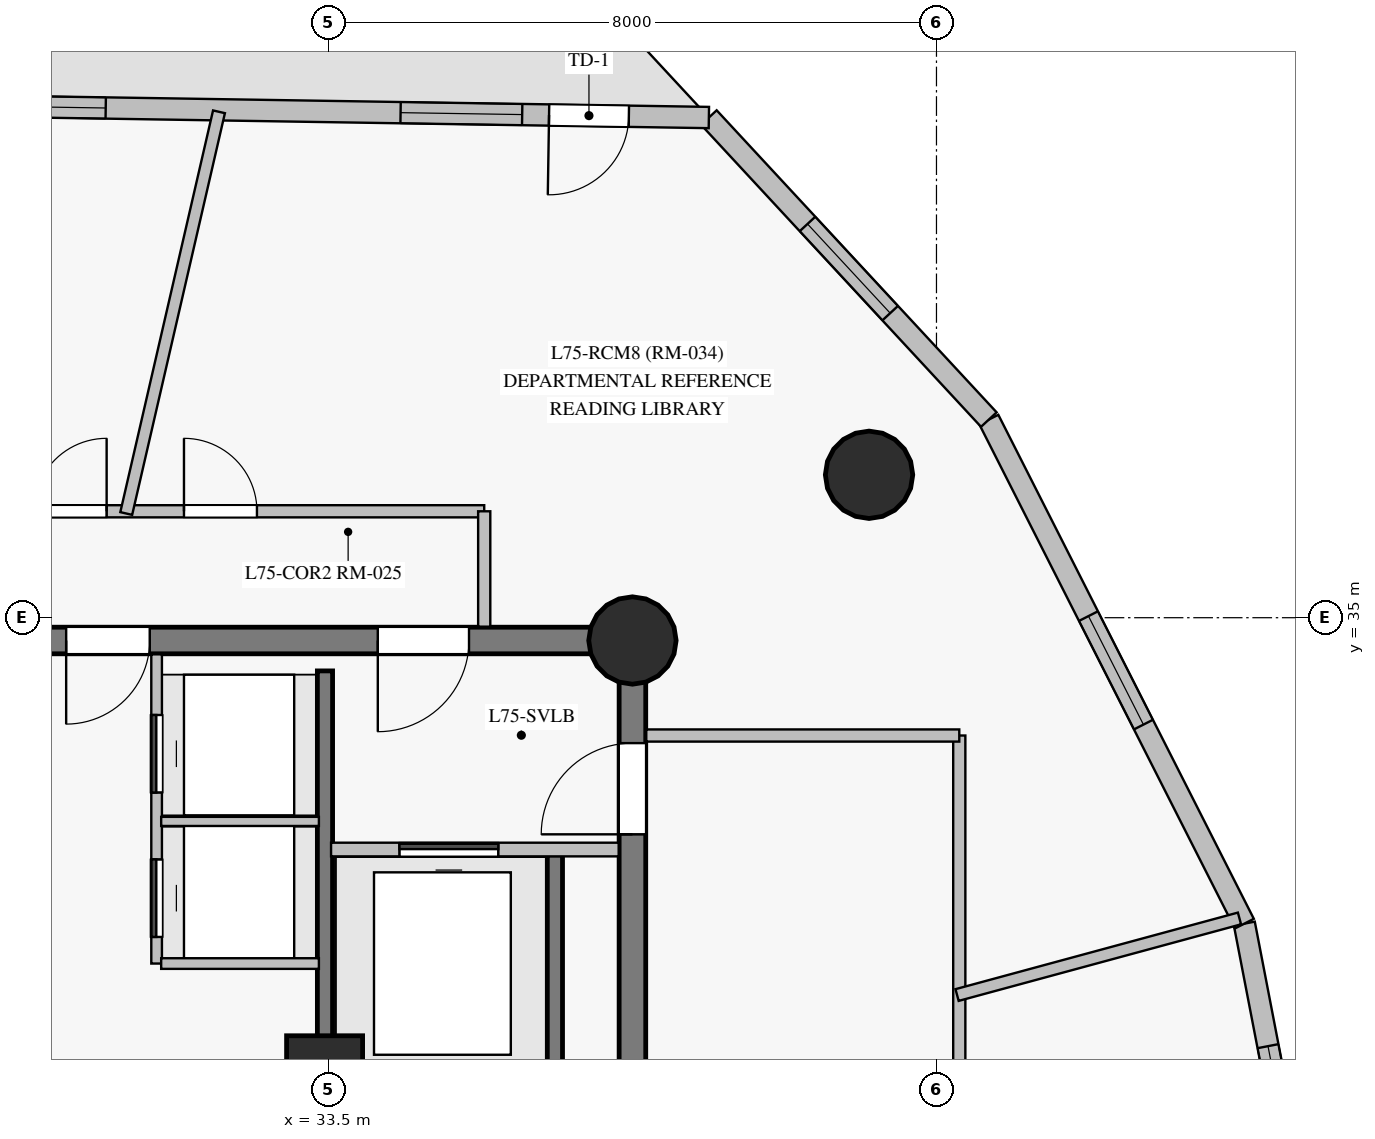
"""IFC4 building model, lengths in metres.
Left out: names, types, materials, properties, quantities, classifications, styles, units other than length and angle.
Written with IfcOpenShell. Run it as: python <this file> out.ifc"""

import sys

from ifc_helpers import new_model, si_unit, direction, frame, frame_2d, origin, origin_with_axes, origin_2d, place, context, subcontext, project, spatial, rectangle, circle, extrude, source, transform, mapped, element, fill, save


model = new_model("IFC4")
c1 = context("Model", 3, precision=1e-05, world=origin(), true_north=direction((0.0, 1.0)))
c2 = subcontext(c1, "Body", "Model", "MODEL_VIEW")
j1 = project(units=[si_unit("LENGTHUNIT", "METRE"), si_unit("PLANEANGLEUNIT", "RADIAN")], contexts=[c1])
p1 = place(None, origin())
s1 = spatial("IfcSite", under=j1, at=p1, CompositionType="ELEMENT")
p2 = place(p1, origin())
s2 = spatial("IfcBuilding", under=s1, at=p2, CompositionType="ELEMENT")
p3 = place(p2, frame((0.0, 0.0, 253.5)))
s3 = spatial("IfcBuildingStorey", under=s2, at=p3, CompositionType="ELEMENT", Elevation=253.5)
p4 = place(p3, frame((37.5, 18.3, 0.0), z_axis=(0.0, 0.0, 1.0), x_axis=(0.0, 1.0, 0.0)))
e1 = element("IfcWall", 1, at=p4, inside=s3, PredefinedType="SHEAR", context=c2, shape_type="SweptSolid", body=[
    extrude(rectangle(XDim=16.4, YDim=0.35, at=frame_2d((8.2, 0.0))), origin(), (0.0, 0.0, 1.0), 2.85),
])
p5 = place(p4, frame((13.85, 0.0, 0.0)))
e2 = element("IfcOpeningElement", 2, at=p5, cuts=e1, PredefinedType="OPENING", context=c2, shape_type="SweptSolid", body=[
    extrude(rectangle(XDim=1.2, YDim=2.15, at=frame_2d((0.6, 1.075))), frame((0.0, 0.185, 0.0), z_axis=(0.0, -1.0, 0.0), x_axis=(1.0, 0.0, 0.0)), (0.0, 0.0, 1.0), 0.37),
])
p6 = place(p3, frame((37.5, 34.7, 0.0), z_axis=(0.0, 0.0, 1.0), x_axis=(-1.0, 0.0, 0.0)))
e3 = element("IfcWall", 3, at=p6, inside=s3, PredefinedType="SHEAR", context=c2, shape_type="SweptSolid", body=[
    extrude(rectangle(XDim=10.95, YDim=0.35, at=frame_2d((5.475, 0.0))), origin(), (0.0, 0.0, 1.0), 2.85),
])
p7 = place(p6, frame((2.15, 0.0, 0.0)))
e4 = element("IfcOpeningElement", 4, at=p7, cuts=e3, PredefinedType="OPENING", context=c2, shape_type="SweptSolid", body=[
    extrude(rectangle(XDim=1.2, YDim=2.15, at=frame_2d((0.6, 1.075))), frame((0.0, 0.185, 0.0), z_axis=(0.0, -1.0, 0.0), x_axis=(1.0, 0.0, 0.0)), (0.0, 0.0, 1.0), 0.37),
])
p8 = place(p6, frame((6.35, 0.0, 0.0)))
e5 = element("IfcOpeningElement", 5, at=p8, cuts=e3, PredefinedType="OPENING", context=c2, shape_type="SweptSolid", body=[
    extrude(rectangle(XDim=1.1, YDim=2.15, at=frame_2d((0.55, 1.075))), frame((0.0, 0.185, 0.0), z_axis=(0.0, -1.0, 0.0), x_axis=(1.0, 0.0, 0.0)), (0.0, 0.0, 1.0), 0.37),
])
m1 = source(origin_with_axes(), c2, "Body", "SweptSolid", [
    extrude(circle(Radius=0.575, at=origin_2d()), origin(), (0.0, 0.0, 1.0), 3.05),
])
p9 = place(p3, frame((37.5, 34.7, 0.0), z_axis=(0.0, 0.0, 1.0), x_axis=(1.0, 0.0, 0.0)))
e6 = element("IfcColumn", 6, at=p9, inside=s3, PredefinedType="COLUMN", context=c2, shape_type="MappedRepresentation", body=[
    mapped(m1, transform((0.0, 0.0, 0.0), scale=1.0)),
])
m2 = source(origin_with_axes(), c2, "Body", "SweptSolid", [
    extrude(rectangle(XDim=1.0, YDim=1.0, at=origin_2d()), origin(), (0.0, 0.0, 1.0), 3.05),
])
p10 = place(p3, frame((33.45, 29.0, 0.0), z_axis=(0.0, 0.0, 1.0), x_axis=(1.0, 0.0, 0.0)))
e7 = element("IfcColumn", 7, at=p10, inside=s3, PredefinedType="COLUMN", context=c2, shape_type="MappedRepresentation", body=[
    mapped(m2, transform((0.0, 0.0, 0.0), scale=1.0)),
])
p11 = place(p3, frame((40.613, 36.88, 0.0), z_axis=(0.0, 0.0, 1.0), x_axis=(1.0, 0.0, 0.0)))
e8 = element("IfcColumn", 8, at=p11, inside=s3, PredefinedType="COLUMN", context=c2, shape_type="MappedRepresentation", body=[
    mapped(m1, transform((0.0, 0.0, 0.0), scale=1.0)),
])
p12 = place(p3, frame((47.615, 20.288, 0.0), z_axis=(0.0, 0.0, 1.0), x_axis=(-0.189663427648, 0.981849165714, 0.0)))
e9 = element("IfcWall", 9, at=p12, inside=s3, PredefinedType="SOLIDWALL", context=c2, shape_type="SweptSolid", body=[
    extrude(rectangle(XDim=10.885, YDim=0.28, at=frame_2d((5.442, 0.0))), origin(), (0.0, 0.0, 1.0), 2.85),
])
p13 = place(p12, frame((0.524, 0.0, 0.85)))
e10 = element("IfcOpeningElement", 10, at=p13, cuts=e9, PredefinedType="OPENING", context=c2, shape_type="SweptSolid", body=[
    extrude(rectangle(XDim=0.95, YDim=1.5, at=frame_2d((0.475, 0.75))), frame((0.0, 0.15, 0.0), z_axis=(0.0, -1.0, 0.0), x_axis=(1.0, 0.0, 0.0)), (0.0, 0.0, 1.0), 0.3),
])
p14 = place(p12, frame((3.52, 0.0, 0.85)))
e11 = element("IfcOpeningElement", 11, at=p14, cuts=e9, PredefinedType="OPENING", context=c2, shape_type="SweptSolid", body=[
    extrude(rectangle(XDim=1.6, YDim=1.6, at=frame_2d((0.8, 0.8))), frame((0.0, 0.15, 0.0), z_axis=(0.0, -1.0, 0.0), x_axis=(1.0, 0.0, 0.0)), (0.0, 0.0, 1.0), 0.3),
])
p15 = place(p12, frame((7.643, 0.0, 0.85)))
e12 = element("IfcOpeningElement", 12, at=p15, cuts=e9, PredefinedType="OPENING", context=c2, shape_type="SweptSolid", body=[
    extrude(rectangle(XDim=1.6, YDim=1.6, at=frame_2d((0.8, 0.8))), frame((0.0, 0.15, 0.0), z_axis=(0.0, -1.0, 0.0), x_axis=(1.0, 0.0, 0.0)), (0.0, 0.0, 1.0), 0.3),
])
p16 = place(p3, frame((45.55, 30.975, 0.0), z_axis=(0.0, 0.0, 1.0), x_axis=(-0.45213236111, 0.891950855169, 0.0)))
e13 = element("IfcWall", 13, at=p16, inside=s3, PredefinedType="SOLIDWALL", context=c2, shape_type="SweptSolid", body=[
    extrude(rectangle(XDim=7.435, YDim=0.28, at=frame_2d((3.717, 0.0))), origin(), (0.0, 0.0, 1.0), 2.85),
])
p17 = place(p16, frame((2.936, 0.0, 0.85)))
e14 = element("IfcOpeningElement", 14, at=p17, cuts=e13, PredefinedType="OPENING", context=c2, shape_type="SweptSolid", body=[
    extrude(rectangle(XDim=1.6, YDim=1.6, at=frame_2d((0.8, 0.8))), frame((0.0, 0.15, 0.0), z_axis=(0.0, -1.0, 0.0), x_axis=(1.0, 0.0, 0.0)), (0.0, 0.0, 1.0), 0.3),
])
p18 = place(p3, frame((42.189, 37.606, 0.0), z_axis=(0.0, 0.0, 1.0), x_axis=(-0.67978713035, 0.733409474584, 0.0)))
e15 = element("IfcWall", 15, at=p18, inside=s3, PredefinedType="SOLIDWALL", context=c2, shape_type="SweptSolid", body=[
    extrude(rectangle(XDim=5.418, YDim=0.28, at=frame_2d((2.709, 0.0))), origin(), (0.0, 0.0, 1.0), 2.85),
])
p19 = place(p18, frame((1.909, 0.0, 0.85)))
e16 = element("IfcOpeningElement", 16, at=p19, cuts=e15, PredefinedType="OPENING", context=c2, shape_type="SweptSolid", body=[
    extrude(rectangle(XDim=1.6, YDim=1.6, at=frame_2d((0.8, 0.8))), frame((0.0, 0.15, 0.0), z_axis=(0.0, -1.0, 0.0), x_axis=(1.0, 0.0, 0.0)), (0.0, 0.0, 1.0), 0.3),
])
p20 = place(p3, frame((38.506, 41.58, 0.0), z_axis=(0.0, 0.0, 1.0), x_axis=(-0.999875036168, 0.015808606765, 0.0)))
e17 = element("IfcWall", 17, at=p20, inside=s3, PredefinedType="SOLIDWALL", context=c2, shape_type="SweptSolid", body=[
    extrude(rectangle(XDim=18.934, YDim=0.28, at=frame_2d((9.467, 0.0))), origin(), (0.0, 0.0, 1.0), 2.85),
])
p21 = place(p20, frame((2.456, 0.0, 0.85)))
e18 = element("IfcOpeningElement", 18, at=p21, cuts=e17, PredefinedType="OPENING", context=c2, shape_type="SweptSolid", body=[
    extrude(rectangle(XDim=1.6, YDim=1.6, at=frame_2d((0.8, 0.8))), frame((0.0, 0.15, 0.0), z_axis=(0.0, -1.0, 0.0), x_axis=(1.0, 0.0, 0.0)), (0.0, 0.0, 1.0), 0.3),
])
p22 = place(p20, frame((7.936, 0.0, 0.85)))
e19 = element("IfcOpeningElement", 19, at=p22, cuts=e17, PredefinedType="OPENING", context=c2, shape_type="SweptSolid", body=[
    extrude(rectangle(XDim=1.6, YDim=1.6, at=frame_2d((0.8, 0.8))), frame((0.0, 0.15, 0.0), z_axis=(0.0, -1.0, 0.0), x_axis=(1.0, 0.0, 0.0)), (0.0, 0.0, 1.0), 0.3),
])
p23 = place(p20, frame((11.863, 0.0, 0.85)))
e20 = element("IfcOpeningElement", 20, at=p23, cuts=e17, PredefinedType="OPENING", context=c2, shape_type="SweptSolid", body=[
    extrude(rectangle(XDim=1.6, YDim=1.6, at=frame_2d((0.8, 0.8))), frame((0.0, 0.15, 0.0), z_axis=(0.0, -1.0, 0.0), x_axis=(1.0, 0.0, 0.0)), (0.0, 0.0, 1.0), 0.3),
])
p24 = place(p20, frame((15.79, 0.0, 0.85)))
e21 = element("IfcOpeningElement", 21, at=p24, cuts=e17, PredefinedType="OPENING", context=c2, shape_type="SweptSolid", body=[
    extrude(rectangle(XDim=1.6, YDim=1.6, at=frame_2d((0.8, 0.8))), frame((0.0, 0.15, 0.0), z_axis=(0.0, -1.0, 0.0), x_axis=(1.0, 0.0, 0.0)), (0.0, 0.0, 1.0), 0.3),
])
p25 = place(p20, frame((1.053, 0.0, 0.0)))
e22 = element("IfcOpeningElement", 22, at=p25, cuts=e17, PredefinedType="OPENING", context=c2, shape_type="SweptSolid", body=[
    extrude(rectangle(XDim=1.05, YDim=2.12, at=frame_2d((0.525, 1.06))), frame((0.0, 0.15, 0.0), z_axis=(0.0, -1.0, 0.0), x_axis=(1.0, 0.0, 0.0)), (0.0, 0.0, 1.0), 0.3),
])
p26 = place(p3, frame((33.455, 18.7, 0.0), z_axis=(0.0, 0.0, 1.0), x_axis=(0.0, 1.0, 0.0)))
e23 = element("IfcWall", 23, at=p26, inside=s3, PredefinedType="SHEAR", context=c2, shape_type="SweptSolid", body=[
    extrude(rectangle(XDim=15.6, YDim=0.2, at=frame_2d((7.8, 0.0))), origin(), (0.0, 0.0, 1.0), 2.85),
])
p27 = place(p26, frame((2.75, 0.0, 0.0)))
e24 = element("IfcOpeningElement", 24, at=p27, cuts=e23, PredefinedType="OPENING", context=c2, shape_type="SweptSolid", body=[
    extrude(rectangle(XDim=1.15, YDim=2.15, at=frame_2d((0.575, 1.075))), frame((0.0, 0.11, 0.0), z_axis=(0.0, -1.0, 0.0), x_axis=(1.0, 0.0, 0.0)), (0.0, 0.0, 1.0), 0.22),
])
p28 = place(p26, frame((0.55, 0.0, 0.0)))
e25 = element("IfcOpeningElement", 25, at=p28, cuts=e23, PredefinedType="OPENING", context=c2, shape_type="SweptSolid", body=[
    extrude(rectangle(XDim=0.94, YDim=2.1, at=frame_2d((0.47, 1.05))), frame((0.0, 0.11, 0.0), z_axis=(0.0, -1.0, 0.0), x_axis=(1.0, 0.0, 0.0)), (0.0, 0.0, 1.0), 0.22),
])
p29 = place(p3, frame((36.48, 29.02, 0.0), z_axis=(0.0, 0.0, 1.0), x_axis=(0.0, 1.0, 0.0)))
e26 = element("IfcWall", 26, at=p29, inside=s3, PredefinedType="SHEAR", context=c2, shape_type="SweptSolid", body=[
    extrude(rectangle(XDim=2.86, YDim=0.2, at=frame_2d((1.43, 0.0))), origin(), (0.0, 0.0, 1.0), 2.85),
])
p30 = place(p3, frame((41.8, 33.45, 0.0), z_axis=(0.0, 0.0, 1.0), x_axis=(0.0, -1.0, 0.0)))
e27 = element("IfcWall", 27, at=p30, inside=s3, PredefinedType="PARTITIONING", context=c2, shape_type="SweptSolid", body=[
    extrude(rectangle(XDim=19.6, YDim=0.16, at=frame_2d((9.8, 0.0))), origin(), (0.0, 0.0, 1.0), 2.3),
])
p31 = place(p30, frame((12.265, 0.0, 0.0)))
e28 = element("IfcOpeningElement", 28, at=p31, cuts=e27, PredefinedType="OPENING", context=c2, shape_type="SweptSolid", body=[
    extrude(rectangle(XDim=0.96, YDim=2.15, at=frame_2d((0.48, 1.075))), frame((0.0, 0.09, 0.0), z_axis=(0.0, -1.0, 0.0), x_axis=(1.0, 0.0, 0.0)), (0.0, 0.0, 1.0), 0.18),
])
p32 = place(p30, frame((8.835, 0.0, 0.0)))
e29 = element("IfcOpeningElement", 29, at=p32, cuts=e27, PredefinedType="OPENING", context=c2, shape_type="SweptSolid", body=[
    extrude(rectangle(XDim=0.96, YDim=2.15, at=frame_2d((0.48, 1.075))), frame((0.0, 0.09, 0.0), z_axis=(0.0, -1.0, 0.0), x_axis=(1.0, 0.0, 0.0)), (0.0, 0.0, 1.0), 0.18),
])
p33 = place(p3, frame((28.6, 36.4, 0.0), z_axis=(0.0, 0.0, 1.0), x_axis=(1.0, 0.0, 0.0)))
e30 = element("IfcWall", 30, at=p33, inside=s3, PredefinedType="PARTITIONING", context=c2, shape_type="SweptSolid", body=[
    extrude(rectangle(XDim=6.95, YDim=0.16, at=frame_2d((3.475, 0.0))), origin(), (0.0, 0.0, 1.0), 2.45),
])
p34 = place(p33, frame((3.0, 0.0, 0.0)))
e31 = element("IfcOpeningElement", 31, at=p34, cuts=e30, PredefinedType="OPENING", context=c2, shape_type="SweptSolid", body=[
    extrude(rectangle(XDim=0.96, YDim=2.15, at=frame_2d((0.48, 1.075))), frame((0.0, 0.09, 0.0), z_axis=(0.0, -1.0, 0.0), x_axis=(1.0, 0.0, 0.0)), (0.0, 0.0, 1.0), 0.18),
])
p35 = place(p33, frame((1.022, 0.0, 0.0)))
e32 = element("IfcOpeningElement", 32, at=p35, cuts=e30, PredefinedType="OPENING", context=c2, shape_type="SweptSolid", body=[
    extrude(rectangle(XDim=0.96, YDim=2.15, at=frame_2d((0.48, 1.075))), frame((0.0, 0.09, 0.0), z_axis=(0.0, -1.0, 0.0), x_axis=(1.0, 0.0, 0.0)), (0.0, 0.0, 1.0), 0.18),
])
p36 = place(p3, frame((30.84, 36.371, 0.0), z_axis=(0.0, 0.0, 1.0), x_axis=(0.224977855342, 0.974363876899, 0.0)))
e33 = element("IfcWall", 33, at=p36, inside=s3, PredefinedType="PARTITIONING", context=c2, shape_type="SweptSolid", body=[
    extrude(rectangle(XDim=5.424, YDim=0.16, at=frame_2d((2.712, 0.0))), origin(), (0.0, 0.0, 1.0), 2.85),
])
p37 = place(p3, frame((37.682, 33.45, 0.0), z_axis=(0.0, 0.0, 1.0), x_axis=(1.0, 0.0, 0.0)))
e34 = element("IfcWall", 34, at=p37, inside=s3, PredefinedType="PARTITIONING", context=c2, shape_type="SweptSolid", body=[
    extrude(rectangle(XDim=4.118, YDim=0.16, at=frame_2d((2.059, 0.0))), origin(), (0.0, 0.0, 1.0), 2.85),
])
p38 = place(p3, frame((31.24, 30.45, 0.0), z_axis=(0.0, 0.0, 1.0), x_axis=(0.0, 1.0, 0.0)))
e35 = element("IfcWall", 35, at=p38, inside=s3, PredefinedType="PARTITIONING", context=c2, shape_type="SweptSolid", body=[
    extrude(rectangle(XDim=4.068, YDim=0.14, at=frame_2d((2.034, 0.0))), origin(), (0.0, 0.0, 1.0), 2.85),
])
p39 = place(p38, frame((0.35, 0.0, 0.0)))
e36 = element("IfcOpeningElement", 36, at=p39, cuts=e35, PredefinedType="OPENING", context=c2, shape_type="SweptSolid", body=[
    extrude(rectangle(XDim=1.02, YDim=2.15, at=frame_2d((0.51, 1.075))), frame((0.0, 0.08, 0.0), z_axis=(0.0, -1.0, 0.0), x_axis=(1.0, 0.0, 0.0)), (0.0, 0.0, 1.0), 0.16),
])
p40 = place(p38, frame((2.25, 0.0, 0.0)))
e37 = element("IfcOpeningElement", 37, at=p40, cuts=e35, PredefinedType="OPENING", context=c2, shape_type="SweptSolid", body=[
    extrude(rectangle(XDim=1.02, YDim=2.15, at=frame_2d((0.51, 1.075))), frame((0.0, 0.08, 0.0), z_axis=(0.0, -1.0, 0.0), x_axis=(1.0, 0.0, 0.0)), (0.0, 0.0, 1.0), 0.16),
])
p41 = place(p3, frame((41.771, 30.036, 0.0), z_axis=(0.0, 0.0, 1.0), x_axis=(0.965154989502, 0.261678899112, 0.0)))
e38 = element("IfcWall", 38, at=p41, inside=s3, PredefinedType="PARTITIONING", context=c2, shape_type="SweptSolid", body=[
    extrude(rectangle(XDim=3.849, YDim=0.16, at=frame_2d((1.925, 0.0))), origin(), (0.0, 0.0, 1.0), 2.85),
])
p42 = place(p3, frame((33.535, 31.95, 0.0), z_axis=(0.0, 0.0, 1.0), x_axis=(1.0, 0.0, 0.0)))
e39 = element("IfcWall", 39, at=p42, inside=s3, PredefinedType="PARTITIONING", context=c2, shape_type="SweptSolid", body=[
    extrude(rectangle(XDim=3.784, YDim=0.18, at=frame_2d((1.892, 0.0))), origin(), (0.0, 0.0, 1.0), 2.85),
])
p43 = place(p42, frame((0.9, 0.0, 0.0)))
e40 = element("IfcOpeningElement", 40, at=p43, cuts=e39, PredefinedType="OPENING", context=c2, shape_type="SweptSolid", body=[
    extrude(rectangle(XDim=1.3, YDim=2.2, at=frame_2d((0.65, 1.1))), frame((0.0, 0.1, 0.0), z_axis=(0.0, -1.0, 0.0), x_axis=(1.0, 0.0, 0.0)), (0.0, 0.0, 1.0), 0.2),
])
p44 = place(p3, frame((31.3, 30.45, 0.0), z_axis=(0.0, 0.0, 1.0), x_axis=(1.0, 0.0, 0.0)))
e41 = element("IfcWall", 41, at=p44, inside=s3, PredefinedType="PARTITIONING", context=c2, shape_type="SweptSolid", body=[
    extrude(rectangle(XDim=2.075, YDim=0.14, at=frame_2d((1.038, 0.0))), origin(), (0.0, 0.0, 1.0), 2.85),
])
p45 = place(p3, frame((31.3, 32.32, 0.0), z_axis=(0.0, 0.0, 1.0), x_axis=(1.0, 0.0, 0.0)))
e42 = element("IfcWall", 42, at=p45, inside=s3, PredefinedType="PARTITIONING", context=c2, shape_type="SweptSolid", body=[
    extrude(rectangle(XDim=2.075, YDim=0.12, at=frame_2d((1.038, 0.0))), origin(), (0.0, 0.0, 1.0), 2.85),
])
p46 = place(p3, frame((35.55, 36.4, 0.0), z_axis=(0.0, 0.0, 1.0), x_axis=(0.0, -1.0, 0.0)))
e43 = element("IfcWall", 43, at=p46, inside=s3, PredefinedType="PARTITIONING", context=c2, shape_type="SweptSolid", body=[
    extrude(rectangle(XDim=1.518, YDim=0.16, at=frame_2d((0.759, 0.0))), origin(), (0.0, 0.0, 1.0), 2.85),
])
m3 = source(origin_with_axes(), c2, "Body", "SweptSolid", [
    extrude(rectangle(XDim=1.6, YDim=1.6, at=frame_2d((0.8, 0.8))), frame((0.0, 0.03, 0.0), z_axis=(0.0, -1.0, 0.0), x_axis=(1.0, 0.0, 0.0)), (0.0, 0.0, 1.0), 0.06),
])
p47 = place(p15, origin())
e44 = element("IfcWindow", 44, at=p47, inside=s3, PartitioningType="SINGLE_PANEL", PredefinedType="WINDOW", context=c2, shape_type="MappedRepresentation", body=[
    mapped(m3, transform((0.0, 0.0, 0.0), scale=1.0)),
])
fill(e12, e44)
p48 = place(p17, origin())
e45 = element("IfcWindow", 45, at=p48, inside=s3, PartitioningType="SINGLE_PANEL", PredefinedType="WINDOW", context=c2, shape_type="MappedRepresentation", body=[
    mapped(m3, transform((0.0, 0.0, 0.0), scale=1.0)),
])
fill(e14, e45)
p49 = place(p19, origin())
e46 = element("IfcWindow", 46, at=p49, inside=s3, PartitioningType="SINGLE_PANEL", PredefinedType="WINDOW", context=c2, shape_type="MappedRepresentation", body=[
    mapped(m3, transform((0.0, 0.0, 0.0), scale=1.0)),
])
fill(e16, e46)
p50 = place(p21, origin())
e47 = element("IfcWindow", 47, at=p50, inside=s3, PartitioningType="SINGLE_PANEL", PredefinedType="WINDOW", context=c2, shape_type="MappedRepresentation", body=[
    mapped(m3, transform((0.0, 0.0, 0.0), scale=1.0)),
])
fill(e18, e47)
p51 = place(p22, origin())
e48 = element("IfcWindow", 48, at=p51, inside=s3, PartitioningType="SINGLE_PANEL", PredefinedType="WINDOW", context=c2, shape_type="MappedRepresentation", body=[
    mapped(m3, transform((0.0, 0.0, 0.0), scale=1.0)),
])
fill(e19, e48)
m4 = source(origin_with_axes(), c2, "Body", "SweptSolid", [
    extrude(rectangle(XDim=1.05, YDim=2.12, at=frame_2d((0.525, 1.06))), frame((0.0, 0.025, 0.0), z_axis=(0.0, -1.0, 0.0), x_axis=(1.0, 0.0, 0.0)), (0.0, 0.0, 1.0), 0.05),
])
p52 = place(p25, origin())
e49 = element("IfcDoor", 49, at=p52, inside=s3, OperationType="SINGLE_SWING_RIGHT", PredefinedType="DOOR", context=c2, shape_type="MappedRepresentation", body=[
    mapped(m4, transform((0.0, 0.0, 0.0), scale=1.0)),
])
fill(e22, e49)
m5 = source(origin_with_axes(), c2, "Body", "SweptSolid", [
    extrude(rectangle(XDim=1.2, YDim=2.15, at=frame_2d((0.6, 1.075))), frame((0.0, 0.025, 0.0), z_axis=(0.0, -1.0, 0.0), x_axis=(1.0, 0.0, 0.0)), (0.0, 0.0, 1.0), 0.05),
])
p53 = place(p5, origin())
e50 = element("IfcDoor", 50, at=p53, inside=s3, OperationType="SINGLE_SWING_LEFT", PredefinedType="DOOR", context=c2, shape_type="MappedRepresentation", body=[
    mapped(m5, transform((0.0, 0.0, 0.0), scale=1.0)),
])
fill(e2, e50)
p54 = place(p7, origin())
e51 = element("IfcDoor", 51, at=p54, inside=s3, OperationType="SINGLE_SWING_RIGHT", PredefinedType="DOOR", context=c2, shape_type="MappedRepresentation", body=[
    mapped(m5, transform((0.0, 0.0, 0.0), scale=1.0)),
])
fill(e4, e51)
m6 = source(origin_with_axes(), c2, "Body", "SweptSolid", [
    extrude(rectangle(XDim=1.3, YDim=2.2, at=frame_2d((0.65, 1.1))), frame((0.0, 0.025, 0.0), z_axis=(0.0, -1.0, 0.0), x_axis=(1.0, 0.0, 0.0)), (0.0, 0.0, 1.0), 0.05),
])
p55 = place(p43, origin())
e52 = element("IfcDoor", 52, at=p55, inside=s3, OperationType="SLIDING_TO_LEFT", PredefinedType="DOOR", context=c2, shape_type="MappedRepresentation", body=[
    mapped(m6, transform((0.0, 0.0, 0.0), scale=1.0)),
])
fill(e40, e52)
m7 = source(origin_with_axes(), c2, "Body", "SweptSolid", [
    extrude(rectangle(XDim=1.1, YDim=2.15, at=frame_2d((0.55, 1.075))), frame((0.0, 0.025, 0.0), z_axis=(0.0, -1.0, 0.0), x_axis=(1.0, 0.0, 0.0)), (0.0, 0.0, 1.0), 0.05),
])
p56 = place(p8, origin())
e53 = element("IfcDoor", 53, at=p56, inside=s3, OperationType="SINGLE_SWING_RIGHT", PredefinedType="DOOR", context=c2, shape_type="MappedRepresentation", body=[
    mapped(m7, transform((0.0, 0.0, 0.0), scale=1.0)),
])
fill(e5, e53)
m8 = source(origin_with_axes(), c2, "Body", "SweptSolid", [
    extrude(rectangle(XDim=1.02, YDim=2.15, at=frame_2d((0.51, 1.075))), frame((0.0, 0.025, 0.0), z_axis=(0.0, -1.0, 0.0), x_axis=(1.0, 0.0, 0.0)), (0.0, 0.0, 1.0), 0.05),
])
p57 = place(p39, origin())
e54 = element("IfcDoor", 54, at=p57, inside=s3, OperationType="SLIDING_TO_LEFT", PredefinedType="DOOR", context=c2, shape_type="MappedRepresentation", body=[
    mapped(m8, transform((0.0, 0.0, 0.0), scale=1.0)),
])
fill(e36, e54)
p58 = place(p40, origin())
e55 = element("IfcDoor", 55, at=p58, inside=s3, OperationType="SLIDING_TO_LEFT", PredefinedType="DOOR", context=c2, shape_type="MappedRepresentation", body=[
    mapped(m8, transform((0.0, 0.0, 0.0), scale=1.0)),
])
fill(e37, e55)
m9 = source(origin_with_axes(), c2, "Body", "SweptSolid", [
    extrude(rectangle(XDim=0.96, YDim=2.15, at=frame_2d((0.48, 1.075))), frame((0.0, 0.025, 0.0), z_axis=(0.0, -1.0, 0.0), x_axis=(1.0, 0.0, 0.0)), (0.0, 0.0, 1.0), 0.05),
])
p59 = place(p34, origin())
e56 = element("IfcDoor", 56, at=p59, inside=s3, OperationType="SINGLE_SWING_LEFT", PredefinedType="DOOR", context=c2, shape_type="MappedRepresentation", body=[
    mapped(m9, transform((0.0, 0.0, 0.0), scale=1.0)),
])
fill(e31, e56)
p60 = place(p35, origin())
e57 = element("IfcDoor", 57, at=p60, inside=s3, OperationType="SINGLE_SWING_RIGHT", PredefinedType="DOOR", context=c2, shape_type="MappedRepresentation", body=[
    mapped(m9, transform((0.0, 0.0, 0.0), scale=1.0)),
])
fill(e32, e57)
save(model, sys.argv[1])
